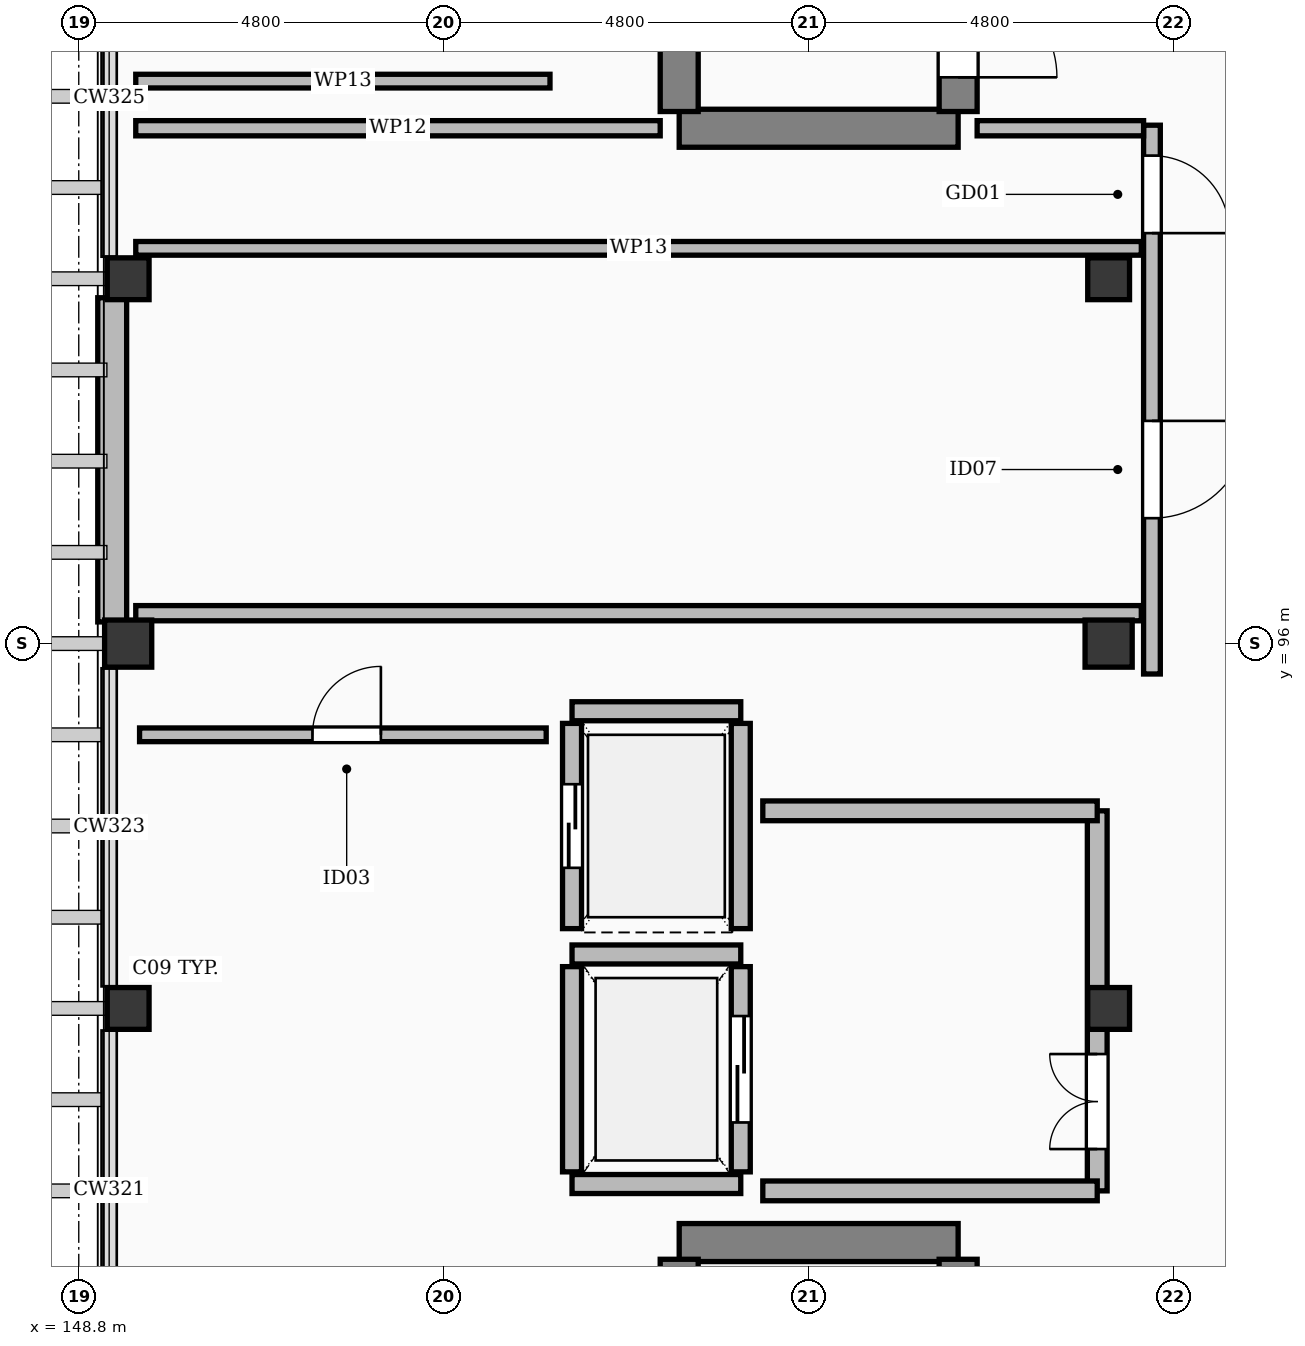
"""IFC4 building model, lengths in metres.
Left out: names, types, materials, properties, quantities, classifications, styles, units other than length and angle.
Written with IfcOpenShell. Run it as: python <this file> out.ifc"""

import sys

from ifc_helpers import new_model, si_unit, direction, frame, frame_2d, origin, origin_2d, place, context, subcontext, project, spatial, rectangle, extrude, element, fill, save


model = new_model("IFC4")
c1 = context("Model", 3, precision=1e-05, world=origin(), true_north=direction((0.0, 1.0)))
c2 = subcontext(c1, "Body", "Model", "MODEL_VIEW")
j1 = project(units=[si_unit("LENGTHUNIT", "METRE"), si_unit("PLANEANGLEUNIT", "RADIAN")], contexts=[c1])
p1 = place(None, origin())
s1 = spatial("IfcSite", under=j1, at=p1, CompositionType="ELEMENT")
p2 = place(p1, origin())
s2 = spatial("IfcBuilding", under=s1, at=p2, CompositionType="ELEMENT")
p3 = place(p2, frame((0.0, 0.0, 42.6)))
s3 = spatial("IfcBuildingStorey", under=s2, at=p3, CompositionType="ELEMENT", Elevation=42.6)
for number, where, z_axis, x_axis in (
    (1, (149.45, 96.0, 0.0), (0.0, 0.0, 1.0), (1.0, 0.0, 0.0)),
    (2, (162.35, 96.0, 0.0), (0.0, 0.0, 1.0), (1.0, 0.0, 0.0)),
):
    element("IfcColumn", number, at=place(p3, frame(where, z_axis=z_axis, x_axis=x_axis)), inside=s3, PredefinedType="COLUMN", context=c2, shape_type="SweptSolid", body=[
        extrude(rectangle(XDim=0.62, YDim=0.62, at=origin_2d()), origin(), (0.0, 0.0, 1.0), 3.9),
    ])
for number, where, z_axis, x_axis in (
    (3, (149.45, 91.2, 0.0), (0.0, 0.0, 1.0), (1.0, 0.0, 0.0)),
    (4, (149.45, 100.8, 0.0), (0.0, 0.0, 1.0), (1.0, 0.0, 0.0)),
    (5, (162.35, 91.2, 0.0), (0.0, 0.0, 1.0), (1.0, 0.0, 0.0)),
    (6, (162.35, 100.8, 0.0), (0.0, 0.0, 1.0), (1.0, 0.0, 0.0)),
):
    element("IfcColumn", number, at=place(p3, frame(where, z_axis=z_axis, x_axis=x_axis)), inside=s3, PredefinedType="COLUMN", context=c2, shape_type="SweptSolid", body=[
        extrude(rectangle(XDim=0.55, YDim=0.55, at=origin_2d()), origin(), (0.0, 0.0, 1.0), 3.9),
    ])
p4 = place(p3, frame((149.24, 96.285, 0.0), z_axis=(0.0, 0.0, 1.0), x_axis=(0.0, 1.0, 0.0)))
e7 = element("IfcWall", 7, at=p4, inside=s3, PredefinedType="SOLIDWALL", context=c2, shape_type="SweptSolid", body=[
    extrude(rectangle(XDim=4.265, YDim=0.38, at=frame_2d((2.133, 0.0))), origin(), (0.0, 0.0, 1.0), 3.072),
])
p5 = place(p3, frame((156.7, 88.12, 0.0), z_axis=(0.0, 0.0, 1.0), x_axis=(1.0, 0.0, 0.0)))
e8 = element("IfcWall", 8, at=p5, inside=s3, PredefinedType="SHEAR", context=c2, shape_type="SweptSolid", body=[
    extrude(rectangle(XDim=3.67, YDim=0.5, at=frame_2d((1.835, 0.0))), origin(), (0.0, 0.0, 1.0), 3.66),
])
p6 = place(p3, frame((156.7, 77.4, 0.0), z_axis=(0.0, 0.0, 1.0), x_axis=(0.0, 1.0, 0.0)))
e9 = element("IfcWall", 9, at=p6, inside=s3, PredefinedType="SHEAR", context=c2, shape_type="SweptSolid", body=[
    extrude(rectangle(XDim=10.5, YDim=0.5, at=frame_2d((5.25, 0.0))), origin(), (0.0, 0.0, 1.0), 3.66),
])
p7 = place(p3, frame((160.37, 77.4, 0.0), z_axis=(0.0, 0.0, 1.0), x_axis=(0.0, 1.0, 0.0)))
e10 = element("IfcWall", 10, at=p7, inside=s3, PredefinedType="SHEAR", context=c2, shape_type="SweptSolid", body=[
    extrude(rectangle(XDim=10.5, YDim=0.5, at=frame_2d((5.25, 0.0))), origin(), (0.0, 0.0, 1.0), 3.66),
])
p8 = place(p7, frame((0.45, 0.0, 0.0)))
e11 = element("IfcOpeningElement", 11, at=p8, cuts=e10, PredefinedType="OPENING", context=c2, shape_type="SweptSolid", body=[
    extrude(rectangle(XDim=1.3, YDim=2.15, at=frame_2d((0.65, 1.075))), frame((0.0, 0.262, 0.0), z_axis=(0.0, -1.0, 0.0), x_axis=(1.0, 0.0, 0.0)), (0.0, 0.0, 1.0), 0.524),
])
for number, where, z_axis, x_axis in (
    (12, (155.29, 88.89, 0.0), (0.0, 0.0, 1.0), (1.0, 0.0, 0.0)),
    (13, (155.29, 91.91, 0.0), (0.0, 0.0, 1.0), (1.0, 0.0, 0.0)),
):
    element("IfcWall", number, at=place(p3, frame(where, z_axis=z_axis, x_axis=x_axis)), inside=s3, PredefinedType="SOLIDWALL", context=c2, shape_type="SweptSolid", body=[
        extrude(rectangle(XDim=2.22, YDim=0.25, at=frame_2d((1.11, 0.0))), origin(), (0.0, 0.0, 1.0), 3.66),
    ])
p9 = place(p3, frame((155.29, 89.05, 0.0), z_axis=(0.0, 0.0, 1.0), x_axis=(0.0, 1.0, 0.0)))
e14 = element("IfcWall", 14, at=p9, inside=s3, PredefinedType="SOLIDWALL", context=c2, shape_type="SweptSolid", body=[
    extrude(rectangle(XDim=2.7, YDim=0.25, at=frame_2d((1.35, 0.0))), origin(), (0.0, 0.0, 1.0), 3.072),
])
p10 = place(p3, frame((157.51, 89.05, 0.0), z_axis=(0.0, 0.0, 1.0), x_axis=(0.0, 1.0, 0.0)))
e15 = element("IfcWall", 15, at=p10, inside=s3, PredefinedType="SOLIDWALL", context=c2, shape_type="SweptSolid", body=[
    extrude(rectangle(XDim=2.7, YDim=0.25, at=frame_2d((1.35, 0.0))), origin(), (0.0, 0.0, 1.0), 3.072),
])
p11 = place(p10, frame((0.65, 0.0, 0.0)))
e16 = element("IfcOpeningElement", 16, at=p11, cuts=e15, PredefinedType="OPENING", context=c2, shape_type="SweptSolid", body=[
    extrude(rectangle(XDim=1.4, YDim=2.3, at=frame_2d((0.7, 1.15))), frame((0.0, 0.137, 0.0), z_axis=(0.0, -1.0, 0.0), x_axis=(1.0, 0.0, 0.0)), (0.0, 0.0, 1.0), 0.274),
])
p12 = place(p3, frame((155.29, 95.11, 0.0), z_axis=(0.0, 0.0, 1.0), x_axis=(1.0, 0.0, 0.0)))
e17 = element("IfcWall", 17, at=p12, inside=s3, PredefinedType="SOLIDWALL", context=c2, shape_type="SweptSolid", body=[
    extrude(rectangle(XDim=2.22, YDim=0.25, at=frame_2d((1.11, 0.0))), origin(), (0.0, 0.0, 1.0), 3.66),
])
p13 = place(p3, frame((155.29, 92.25, 0.0), z_axis=(0.0, 0.0, 1.0), x_axis=(0.0, 1.0, 0.0)))
e18 = element("IfcWall", 18, at=p13, inside=s3, PredefinedType="SOLIDWALL", context=c2, shape_type="SweptSolid", body=[
    extrude(rectangle(XDim=2.7, YDim=0.25, at=frame_2d((1.35, 0.0))), origin(), (0.0, 0.0, 1.0), 3.66),
])
p14 = place(p13, frame((0.8, 0.0, 0.0)))
e19 = element("IfcOpeningElement", 19, at=p14, cuts=e18, PredefinedType="OPENING", context=c2, shape_type="SweptSolid", body=[
    extrude(rectangle(XDim=1.1, YDim=2.2, at=frame_2d((0.55, 1.1))), frame((0.0, 0.137, 0.0), z_axis=(0.0, -1.0, 0.0), x_axis=(1.0, 0.0, 0.0)), (0.0, 0.0, 1.0), 0.274),
])
p15 = place(p3, frame((157.51, 92.25, 0.0), z_axis=(0.0, 0.0, 1.0), x_axis=(0.0, 1.0, 0.0)))
e20 = element("IfcWall", 20, at=p15, inside=s3, PredefinedType="SOLIDWALL", context=c2, shape_type="SweptSolid", body=[
    extrude(rectangle(XDim=2.7, YDim=0.25, at=frame_2d((1.35, 0.0))), origin(), (0.0, 0.0, 1.0), 3.66),
])
p16 = place(p3, frame((162.2, 88.8, 0.0), z_axis=(0.0, 0.0, 1.0), x_axis=(0.0, 1.0, 0.0)))
e21 = element("IfcWall", 21, at=p16, inside=s3, PredefinedType="SOLIDWALL", context=c2, shape_type="SweptSolid", body=[
    extrude(rectangle(XDim=5.0, YDim=0.26, at=frame_2d((2.5, 0.0))), origin(), (0.0, 0.0, 1.0), 3.072),
])
p17 = place(p16, frame((0.55, 0.0, 0.0)))
e22 = element("IfcOpeningElement", 22, at=p17, cuts=e21, PredefinedType="OPENING", context=c2, shape_type="SweptSolid", body=[
    extrude(rectangle(XDim=1.25, YDim=2.15, at=frame_2d((0.625, 1.075))), frame((0.0, 0.142, 0.0), z_axis=(0.0, -1.0, 0.0), x_axis=(1.0, 0.0, 0.0)), (0.0, 0.0, 1.0), 0.284),
])
for number, where, z_axis, x_axis in (
    (23, (157.8, 88.8, 0.0), (0.0, 0.0, 1.0), (1.0, 0.0, 0.0)),
    (24, (157.8, 93.8, 0.0), (0.0, 0.0, 1.0), (1.0, 0.0, 0.0)),
):
    element("IfcWall", number, at=place(p3, frame(where, z_axis=z_axis, x_axis=x_axis)), inside=s3, PredefinedType="SOLIDWALL", context=c2, shape_type="SweptSolid", body=[
        extrude(rectangle(XDim=4.4, YDim=0.26, at=frame_2d((2.2, 0.0))), origin(), (0.0, 0.0, 1.0), 3.072),
    ])
p18 = place(p3, frame((156.7, 102.78, 0.0), z_axis=(0.0, 0.0, 1.0), x_axis=(1.0, 0.0, 0.0)))
e25 = element("IfcWall", 25, at=p18, inside=s3, PredefinedType="SHEAR", context=c2, shape_type="SweptSolid", body=[
    extrude(rectangle(XDim=3.67, YDim=0.5, at=frame_2d((1.835, 0.0))), origin(), (0.0, 0.0, 1.0), 3.66),
])
p19 = place(p3, frame((156.7, 103.0, 0.0), z_axis=(0.0, 0.0, 1.0), x_axis=(0.0, 1.0, 0.0)))
e26 = element("IfcWall", 26, at=p19, inside=s3, PredefinedType="SHEAR", context=c2, shape_type="SweptSolid", body=[
    extrude(rectangle(XDim=10.5, YDim=0.5, at=frame_2d((5.25, 0.0))), origin(), (0.0, 0.0, 1.0), 3.66),
])
p20 = place(p3, frame((160.37, 103.0, 0.0), z_axis=(0.0, 0.0, 1.0), x_axis=(0.0, 1.0, 0.0)))
e27 = element("IfcWall", 27, at=p20, inside=s3, PredefinedType="SHEAR", context=c2, shape_type="SweptSolid", body=[
    extrude(rectangle(XDim=10.5, YDim=0.5, at=frame_2d((5.25, 0.0))), origin(), (0.0, 0.0, 1.0), 3.66),
])
p21 = place(p20, frame((0.45, 0.0, 0.0)))
e28 = element("IfcOpeningElement", 28, at=p21, cuts=e27, PredefinedType="OPENING", context=c2, shape_type="SweptSolid", body=[
    extrude(rectangle(XDim=1.3, YDim=2.15, at=frame_2d((0.65, 1.075))), frame((0.0, 0.262, 0.0), z_axis=(0.0, -1.0, 0.0), x_axis=(1.0, 0.0, 0.0)), (0.0, 0.0, 1.0), 0.524),
])
p22 = place(p3, frame((162.92, 95.6, 0.0), z_axis=(0.0, 0.0, 1.0), x_axis=(0.0, 1.0, 0.0)))
e29 = element("IfcWall", 29, at=p22, inside=s3, PredefinedType="PARTITIONING", context=c2, shape_type="SweptSolid", body=[
    extrude(rectangle(XDim=7.22, YDim=0.22, at=frame_2d((3.61, 0.0))), origin(), (0.0, 0.0, 1.0), 3.072),
])
p23 = place(p22, frame((2.05, 0.0, 0.0)))
e30 = element("IfcOpeningElement", 30, at=p23, cuts=e29, PredefinedType="OPENING", context=c2, shape_type="SweptSolid", body=[
    extrude(rectangle(XDim=1.28, YDim=2.16, at=frame_2d((0.64, 1.08))), frame((0.0, 0.122, 0.0), z_axis=(0.0, -1.0, 0.0), x_axis=(1.0, 0.0, 0.0)), (0.0, 0.0, 1.0), 0.244),
])
p24 = place(p22, frame((5.8, 0.0, 0.0)))
e31 = element("IfcOpeningElement", 31, at=p24, cuts=e29, PredefinedType="OPENING", context=c2, shape_type="SweptSolid", body=[
    extrude(rectangle(XDim=1.02, YDim=2.2, at=frame_2d((0.51, 1.1))), frame((0.0, 0.122, 0.0), z_axis=(0.0, -1.0, 0.0), x_axis=(1.0, 0.0, 0.0)), (0.0, 0.0, 1.0), 0.244),
])
p25 = place(p3, frame((149.55, 96.4, 0.0), z_axis=(0.0, 0.0, 1.0), x_axis=(1.0, 0.0, 0.0)))
e32 = element("IfcWall", 32, at=p25, inside=s3, PredefinedType="PARTITIONING", context=c2, shape_type="SweptSolid", body=[
    extrude(rectangle(XDim=13.23, YDim=0.2, at=frame_2d((6.615, 0.0))), origin(), (0.0, 0.0, 1.0), 3.072),
])
p26 = place(p3, frame((149.55, 101.2, 0.0), z_axis=(0.0, 0.0, 1.0), x_axis=(1.0, 0.0, 0.0)))
e33 = element("IfcWall", 33, at=p26, inside=s3, PredefinedType="PARTITIONING", context=c2, shape_type="SweptSolid", body=[
    extrude(rectangle(XDim=13.23, YDim=0.18, at=frame_2d((6.615, 0.0))), origin(), (0.0, 0.0, 1.0), 3.072),
])
p27 = place(p3, frame((149.55, 102.78, 0.0), z_axis=(0.0, 0.0, 1.0), x_axis=(1.0, 0.0, 0.0)))
e34 = element("IfcWall", 34, at=p27, inside=s3, PredefinedType="PARTITIONING", context=c2, shape_type="SweptSolid", body=[
    extrude(rectangle(XDim=6.9, YDim=0.2, at=frame_2d((3.45, 0.0))), origin(), (0.0, 0.0, 1.0), 3.072),
])
p28 = place(p3, frame((160.62, 102.78, 0.0), z_axis=(0.0, 0.0, 1.0), x_axis=(1.0, 0.0, 0.0)))
e35 = element("IfcWall", 35, at=p28, inside=s3, PredefinedType="PARTITIONING", context=c2, shape_type="SweptSolid", body=[
    extrude(rectangle(XDim=2.19, YDim=0.2, at=frame_2d((1.095, 0.0))), origin(), (0.0, 0.0, 1.0), 3.072),
])
p29 = place(p3, frame((149.6, 94.8, 0.0), z_axis=(0.0, 0.0, 1.0), x_axis=(1.0, 0.0, 0.0)))
e36 = element("IfcWall", 36, at=p29, inside=s3, PredefinedType="PARTITIONING", context=c2, shape_type="SweptSolid", body=[
    extrude(rectangle(XDim=5.35, YDim=0.18, at=frame_2d((2.675, 0.0))), origin(), (0.0, 0.0, 1.0), 3.072),
])
p30 = place(p29, frame((2.275, 0.0, 0.0)))
e37 = element("IfcOpeningElement", 37, at=p30, cuts=e36, PredefinedType="OPENING", context=c2, shape_type="SweptSolid", body=[
    extrude(rectangle(XDim=0.9, YDim=2.08, at=frame_2d((0.45, 1.04))), frame((0.0, 0.102, 0.0), z_axis=(0.0, -1.0, 0.0), x_axis=(1.0, 0.0, 0.0)), (0.0, 0.0, 1.0), 0.204),
])
p31 = place(p3, frame((149.55, 103.4, 0.0), z_axis=(0.0, 0.0, 1.0), x_axis=(1.0, 0.0, 0.0)))
e38 = element("IfcWall", 38, at=p31, inside=s3, PredefinedType="PARTITIONING", context=c2, shape_type="SweptSolid", body=[
    extrude(rectangle(XDim=5.45, YDim=0.18, at=frame_2d((2.725, 0.0))), origin(), (0.0, 0.0, 1.0), 3.072),
])
p32 = place(p11, origin())
e39 = element("IfcDoor", 39, at=p32, inside=s3, OperationType="SLIDING_TO_LEFT", PredefinedType="DOOR", context=c2, shape_type="SweptSolid", body=[
    extrude(rectangle(XDim=1.4, YDim=2.3, at=frame_2d((0.7, 1.15))), frame((0.0, 0.025, 0.0), z_axis=(0.0, -1.0, 0.0), x_axis=(1.0, 0.0, 0.0)), (0.0, 0.0, 1.0), 0.05),
])
fill(e16, e39)
p33 = place(p14, origin())
e40 = element("IfcDoor", 40, at=p33, inside=s3, OperationType="SLIDING_TO_LEFT", PredefinedType="DOOR", context=c2, shape_type="SweptSolid", body=[
    extrude(rectangle(XDim=1.1, YDim=2.2, at=frame_2d((0.55, 1.1))), frame((0.0, 0.025, 0.0), z_axis=(0.0, -1.0, 0.0), x_axis=(1.0, 0.0, 0.0)), (0.0, 0.0, 1.0), 0.05),
])
fill(e19, e40)
p34 = place(p17, origin())
e41 = element("IfcDoor", 41, at=p34, inside=s3, OperationType="DOUBLE_DOOR_SINGLE_SWING", PredefinedType="DOOR", context=c2, shape_type="SweptSolid", body=[
    extrude(rectangle(XDim=1.25, YDim=2.15, at=frame_2d((0.625, 1.075))), frame((0.0, 0.025, 0.0), z_axis=(0.0, -1.0, 0.0), x_axis=(1.0, 0.0, 0.0)), (0.0, 0.0, 1.0), 0.05),
])
fill(e22, e41)
p35 = place(p21, frame((1.3, 0.0, 0.0), z_axis=(0.0, 0.0, 1.0), x_axis=(-1.0, 0.0, 0.0)))
e42 = element("IfcDoor", 42, at=p35, inside=s3, OperationType="SINGLE_SWING_LEFT", PredefinedType="DOOR", context=c2, shape_type="SweptSolid", body=[
    extrude(rectangle(XDim=1.3, YDim=2.15, at=frame_2d((0.65, 1.075))), frame((0.0, 0.025, 0.0), z_axis=(0.0, -1.0, 0.0), x_axis=(1.0, 0.0, 0.0)), (0.0, 0.0, 1.0), 0.05),
])
fill(e28, e42)
p36 = place(p23, frame((1.28, 0.0, 0.0), z_axis=(0.0, 0.0, 1.0), x_axis=(-1.0, 0.0, 0.0)))
e43 = element("IfcDoor", 43, at=p36, inside=s3, OperationType="SINGLE_SWING_RIGHT", PredefinedType="DOOR", context=c2, shape_type="SweptSolid", body=[
    extrude(rectangle(XDim=1.28, YDim=2.16, at=frame_2d((0.64, 1.08))), frame((0.0, 0.025, 0.0), z_axis=(0.0, -1.0, 0.0), x_axis=(1.0, 0.0, 0.0)), (0.0, 0.0, 1.0), 0.05),
])
fill(e30, e43)
p37 = place(p24, frame((1.02, 0.0, 0.0), z_axis=(0.0, 0.0, 1.0), x_axis=(-1.0, 0.0, 0.0)))
e44 = element("IfcDoor", 44, at=p37, inside=s3, OperationType="SINGLE_SWING_LEFT", PredefinedType="DOOR", context=c2, shape_type="SweptSolid", body=[
    extrude(rectangle(XDim=1.02, YDim=2.2, at=frame_2d((0.51, 1.1))), frame((0.0, 0.025, 0.0), z_axis=(0.0, -1.0, 0.0), x_axis=(1.0, 0.0, 0.0)), (0.0, 0.0, 1.0), 0.05),
])
fill(e31, e44)
p38 = place(p30, origin())
e45 = element("IfcDoor", 45, at=p38, inside=s3, OperationType="SINGLE_SWING_RIGHT", PredefinedType="DOOR", context=c2, shape_type="SweptSolid", body=[
    extrude(rectangle(XDim=0.9, YDim=2.08, at=frame_2d((0.45, 1.04))), frame((0.0, 0.025, 0.0), z_axis=(0.0, -1.0, 0.0), x_axis=(1.0, 0.0, 0.0)), (0.0, 0.0, 1.0), 0.05),
])
fill(e37, e45)
save(model, sys.argv[1])
